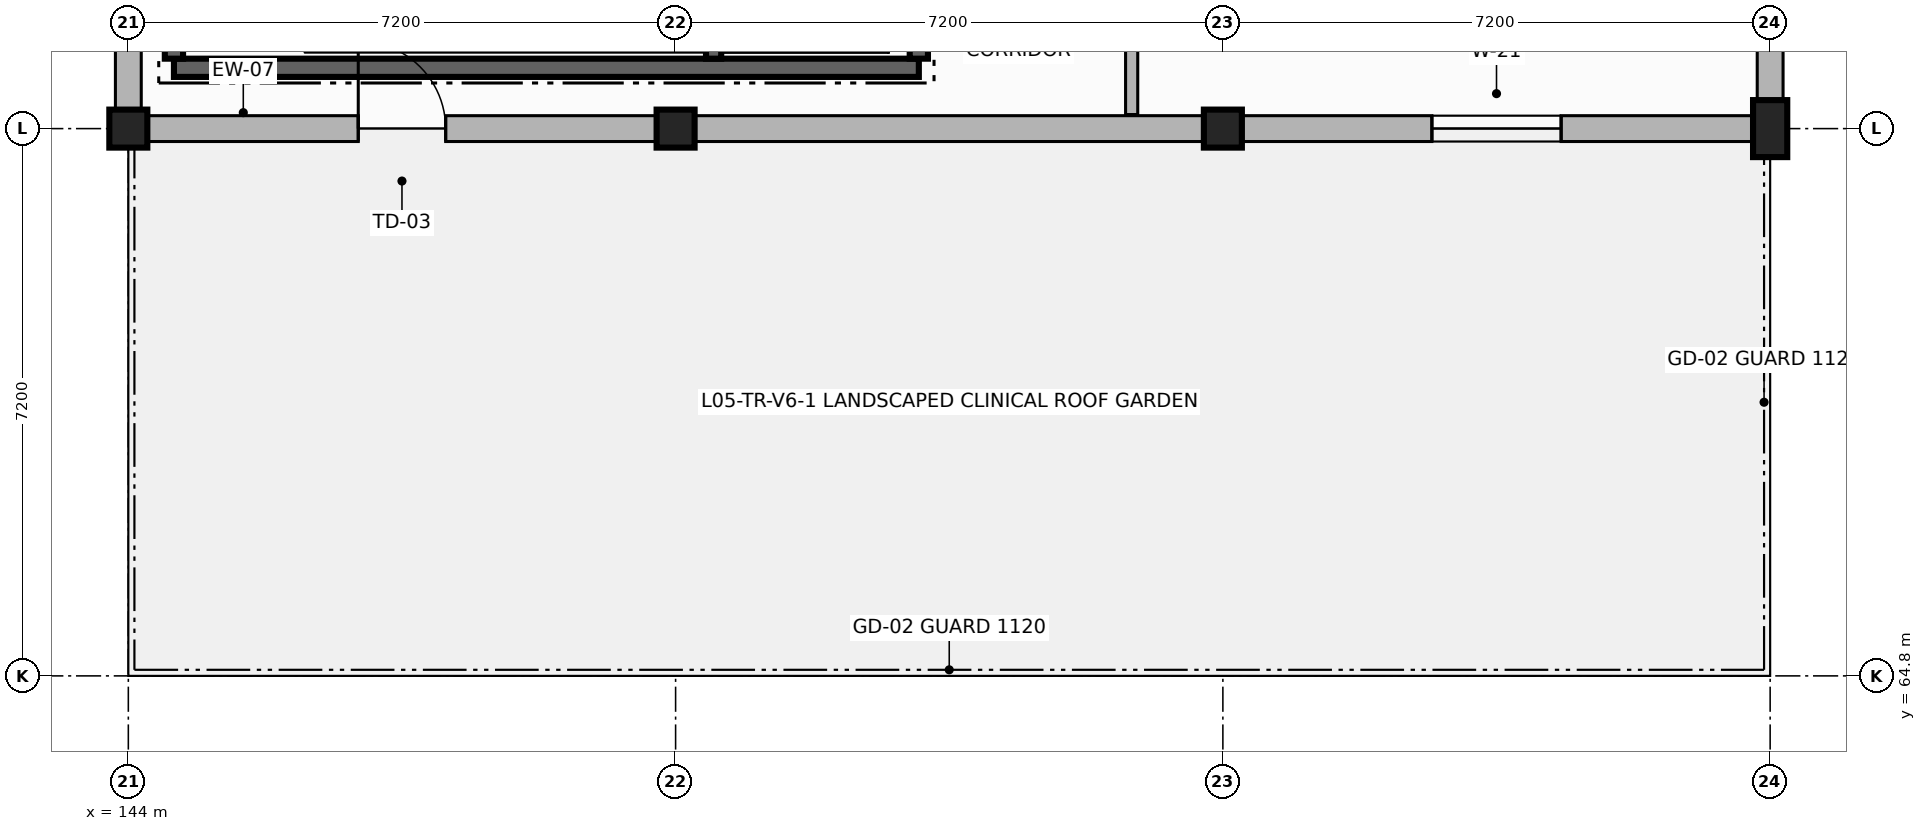
"""IFC4 building model, lengths in metres.
Left out: names, types, materials, properties, quantities, classifications, styles, units other than length and angle.
Written with IfcOpenShell. Run it as: python <this file> out.ifc"""

import sys

from ifc_helpers import new_model, si_unit, direction, frame, frame_2d, origin, origin_2d, place, context, subcontext, project, spatial, rectangle, extrude, element, fill, save


model = new_model("IFC4")
c1 = context("Model", 3, precision=1e-05, world=origin(), true_north=direction((0.0, 1.0)))
c2 = subcontext(c1, "Body", "Model", "MODEL_VIEW")
j1 = project(units=[si_unit("LENGTHUNIT", "METRE"), si_unit("PLANEANGLEUNIT", "RADIAN")], contexts=[c1])
p1 = place(None, origin())
s1 = spatial("IfcSite", under=j1, at=p1, CompositionType="ELEMENT")
p2 = place(p1, origin())
s2 = spatial("IfcBuilding", under=s1, at=p2, CompositionType="ELEMENT")
p3 = place(p2, frame((0.0, 0.0, 19.7)))
s3 = spatial("IfcBuildingStorey", under=s2, at=p3, CompositionType="ELEMENT", Elevation=19.7)
for number, where, z_axis, x_axis in (
    (1, (144.0, 72.0, 0.0), (0.0, 0.0, 1.0), (1.0, 0.0, 0.0)),
    (2, (151.2, 72.0, 0.0), (0.0, 0.0, 1.0), (1.0, 0.0, 0.0)),
    (3, (158.4, 72.0, 0.0), (0.0, 0.0, 1.0), (1.0, 0.0, 0.0)),
):
    element("IfcColumn", number, at=place(p3, frame(where, z_axis=z_axis, x_axis=x_axis)), inside=s3, PredefinedType="COLUMN", context=c2, shape_type="SweptSolid", body=[
        extrude(rectangle(XDim=0.5, YDim=0.5, at=origin_2d()), origin(), (0.0, 0.0, 1.0), 3.46),
    ])
p4 = place(p3, frame((165.6, 72.0, 0.0), z_axis=(0.0, 0.0, 1.0), x_axis=(1.0, 0.0, 0.0)))
e4 = element("IfcColumn", 4, at=p4, inside=s3, PredefinedType="PILASTER", context=c2, shape_type="SweptSolid", body=[
    extrude(rectangle(XDim=0.45, YDim=0.75, at=origin_2d()), origin(), (0.0, 0.0, 1.0), 3.46),
])
p5 = place(p3, frame((144.0, 72.0, 0.0), z_axis=(0.0, 0.0, 1.0), x_axis=(1.0, 0.0, 0.0)))
e5 = element("IfcWall", 5, at=p5, inside=s3, PredefinedType="SOLIDWALL", context=c2, shape_type="SweptSolid", body=[
    extrude(rectangle(XDim=7.2, YDim=0.34, at=frame_2d((3.6, 0.0))), origin(), (0.0, 0.0, 1.0), 2.79),
])
p6 = place(p5, frame((3.025, 0.0, 0.0)))
e6 = element("IfcOpeningElement", 6, at=p6, cuts=e5, PredefinedType="OPENING", context=c2, shape_type="SweptSolid", body=[
    extrude(rectangle(XDim=1.15, YDim=2.2, at=frame_2d((0.575, 1.1))), frame((0.0, 0.18, 0.0), z_axis=(0.0, -1.0, 0.0), x_axis=(1.0, 0.0, 0.0)), (0.0, 0.0, 1.0), 0.36),
])
p7 = place(p3, frame((151.2, 72.0, 0.0), z_axis=(0.0, 0.0, 1.0), x_axis=(1.0, 0.0, 0.0)))
e7 = element("IfcWall", 7, at=p7, inside=s3, PredefinedType="SOLIDWALL", context=c2, shape_type="SweptSolid", body=[
    extrude(rectangle(XDim=7.2, YDim=0.34, at=frame_2d((3.6, 0.0))), origin(), (0.0, 0.0, 1.0), 2.79),
])
p8 = place(p3, frame((158.4, 72.0, 0.0), z_axis=(0.0, 0.0, 1.0), x_axis=(1.0, 0.0, 0.0)))
e8 = element("IfcWall", 8, at=p8, inside=s3, PredefinedType="SOLIDWALL", context=c2, shape_type="SweptSolid", body=[
    extrude(rectangle(XDim=7.2, YDim=0.34, at=frame_2d((3.6, 0.0))), origin(), (0.0, 0.0, 1.0), 2.79),
])
p9 = place(p8, frame((2.75, 0.0, 0.85)))
e9 = element("IfcOpeningElement", 9, at=p9, cuts=e8, PredefinedType="OPENING", context=c2, shape_type="SweptSolid", body=[
    extrude(rectangle(XDim=1.7, YDim=1.65, at=frame_2d((0.85, 0.825))), frame((0.0, 0.18, 0.0), z_axis=(0.0, -1.0, 0.0), x_axis=(1.0, 0.0, 0.0)), (0.0, 0.0, 1.0), 0.36),
])
p10 = place(p3, frame((165.6, 72.0, 0.0), z_axis=(0.0, 0.0, 1.0), x_axis=(0.0, 1.0, 0.0)))
e10 = element("IfcWall", 10, at=p10, inside=s3, PredefinedType="SOLIDWALL", context=c2, shape_type="SweptSolid", body=[
    extrude(rectangle(XDim=7.2, YDim=0.34, at=frame_2d((3.6, 0.0))), origin(), (0.0, 0.0, 1.0), 2.79),
])
p11 = place(p10, frame((2.75, 0.0, 0.85)))
e11 = element("IfcOpeningElement", 11, at=p11, cuts=e10, PredefinedType="OPENING", context=c2, shape_type="SweptSolid", body=[
    extrude(rectangle(XDim=1.7, YDim=1.65, at=frame_2d((0.85, 0.825))), frame((0.0, 0.18, 0.0), z_axis=(0.0, -1.0, 0.0), x_axis=(1.0, 0.0, 0.0)), (0.0, 0.0, 1.0), 0.36),
])
p12 = place(p3, frame((144.0, 79.2, 0.0), z_axis=(0.0, 0.0, 1.0), x_axis=(0.0, -1.0, 0.0)))
e12 = element("IfcWall", 12, at=p12, inside=s3, PredefinedType="SOLIDWALL", context=c2, shape_type="SweptSolid", body=[
    extrude(rectangle(XDim=7.2, YDim=0.34, at=frame_2d((3.6, 0.0))), origin(), (0.0, 0.0, 1.0), 2.79),
])
p13 = place(p3, frame((144.6, 72.8, 0.0), z_axis=(0.0, 0.0, 1.0), x_axis=(1.0, 0.0, 0.0)))
e13 = element("IfcWall", 13, at=p13, inside=s3, PredefinedType="SHEAR", context=c2, shape_type="SweptSolid", body=[
    extrude(rectangle(XDim=9.8, YDim=0.24, at=frame_2d((4.9, 0.0))), origin(), (0.0, 0.0, 1.0), 3.46),
])
p14 = place(p3, frame((154.4, 72.92, 0.0), z_axis=(0.0, 0.0, 1.0), x_axis=(0.0, 1.0, 0.0)))
e14 = element("IfcWall", 14, at=p14, inside=s3, PredefinedType="SHEAR", context=c2, shape_type="SweptSolid", body=[
    extrude(rectangle(XDim=5.56, YDim=0.24, at=frame_2d((2.78, 0.0))), origin(), (0.0, 0.0, 1.0), 3.46),
])
p15 = place(p14, frame((4.09, 0.0, 0.0)))
e15 = element("IfcOpeningElement", 15, at=p15, cuts=e14, PredefinedType="OPENING", context=c2, shape_type="SweptSolid", body=[
    extrude(rectangle(XDim=1.15, YDim=2.2, at=frame_2d((0.575, 1.1))), frame((0.0, 0.13, 0.0), z_axis=(0.0, -1.0, 0.0), x_axis=(1.0, 0.0, 0.0)), (0.0, 0.0, 1.0), 0.26),
])
p16 = place(p3, frame((144.6, 78.48, 0.0), z_axis=(0.0, 0.0, 1.0), x_axis=(0.0, -1.0, 0.0)))
e16 = element("IfcWall", 16, at=p16, inside=s3, PredefinedType="SHEAR", context=c2, shape_type="SweptSolid", body=[
    extrude(rectangle(XDim=5.56, YDim=0.24, at=frame_2d((2.78, 0.0))), origin(), (0.0, 0.0, 1.0), 3.46),
])
p17 = place(p3, frame((151.7, 72.92, 0.0), z_axis=(0.0, 0.0, 1.0), x_axis=(0.0, 1.0, 0.0)))
e17 = element("IfcWall", 17, at=p17, inside=s3, PredefinedType="SHEAR", context=c2, shape_type="SweptSolid", body=[
    extrude(rectangle(XDim=3.68, YDim=0.2, at=frame_2d((1.84, 0.0))), origin(), (0.0, 0.0, 1.0), 3.46),
])
p18 = place(p3, frame((157.2, 72.185, 0.0), z_axis=(0.0, 0.0, 1.0), x_axis=(0.0, 1.0, 0.0)))
e18 = element("IfcWall", 18, at=p18, inside=s3, PredefinedType="PARTITIONING", context=c2, shape_type="SweptSolid", body=[
    extrude(rectangle(XDim=7.015, YDim=0.16, at=frame_2d((3.507, 0.0))), origin(), (0.0, 0.0, 1.0), 2.78),
])
p19 = place(p18, frame((3.017, 0.0, 0.0)))
e19 = element("IfcOpeningElement", 19, at=p19, cuts=e18, PredefinedType="OPENING", context=c2, shape_type="SweptSolid", body=[
    extrude(rectangle(XDim=0.98, YDim=2.15, at=frame_2d((0.49, 1.075))), frame((0.0, 0.09, 0.0), z_axis=(0.0, -1.0, 0.0), x_axis=(1.0, 0.0, 0.0)), (0.0, 0.0, 1.0), 0.18),
])
p20 = place(p6, origin())
e20 = element("IfcDoor", 20, at=p20, inside=s3, OperationType="SINGLE_SWING_LEFT", PredefinedType="DOOR", context=c2, shape_type="SweptSolid", body=[
    extrude(rectangle(XDim=1.15, YDim=2.2, at=frame_2d((0.575, 1.1))), frame((0.0, 0.025, 0.0), z_axis=(0.0, -1.0, 0.0), x_axis=(1.0, 0.0, 0.0)), (0.0, 0.0, 1.0), 0.05),
])
fill(e6, e20)
p21 = place(p9, origin())
e21 = element("IfcWindow", 21, at=p21, inside=s3, PartitioningType="SINGLE_PANEL", PredefinedType="WINDOW", context=c2, shape_type="SweptSolid", body=[
    extrude(rectangle(XDim=1.7, YDim=1.65, at=frame_2d((0.85, 0.825))), frame((0.0, 0.03, 0.0), z_axis=(0.0, -1.0, 0.0), x_axis=(1.0, 0.0, 0.0)), (0.0, 0.0, 1.0), 0.06),
])
fill(e9, e21)
save(model, sys.argv[1])
